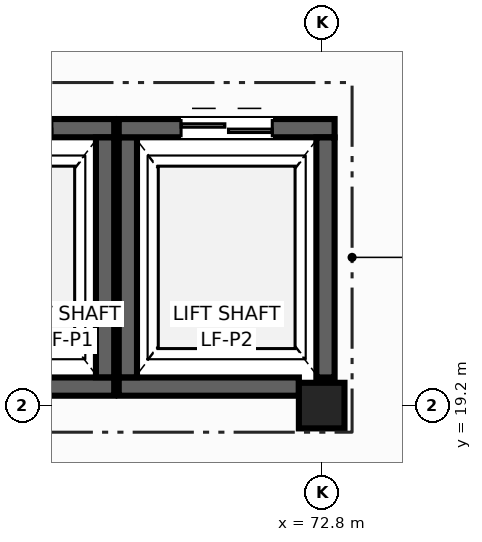
"""IFC4 building model, lengths in metres.
Left out: names, types, materials, properties, quantities, classifications, styles, units other than length and angle.
Written with IfcOpenShell. Run it as: python <this file> out.ifc"""

import sys

from ifc_helpers import new_model, si_unit, direction, frame, frame_2d, origin, origin_2d, place, context, subcontext, project, spatial, rectangle, extrude, element, fill, save


model = new_model("IFC4")
c1 = context("Model", 3, precision=1e-05, world=origin(), true_north=direction((0.0, 1.0)))
c2 = subcontext(c1, "Body", "Model", "MODEL_VIEW")
j1 = project(units=[si_unit("LENGTHUNIT", "METRE"), si_unit("PLANEANGLEUNIT", "RADIAN")], contexts=[c1])
p1 = place(None, origin())
s1 = spatial("IfcSite", under=j1, at=p1, CompositionType="ELEMENT")
p2 = place(p1, origin())
s2 = spatial("IfcBuilding", under=s1, at=p2, CompositionType="ELEMENT")
p3 = place(p2, frame((0.0, 0.0, 14.4)))
s3 = spatial("IfcBuildingStorey", under=s2, at=p3, CompositionType="ELEMENT", Elevation=14.4)
p4 = place(p3, frame((72.8, 19.2, 0.0), z_axis=(0.0, 0.0, 1.0), x_axis=(1.0, 0.0, 0.0)))
e1 = element("IfcColumn", 1, at=p4, inside=s3, PredefinedType="COLUMN", context=c2, shape_type="SweptSolid", body=[
    extrude(rectangle(XDim=0.6, YDim=0.6, at=origin_2d()), origin(), (0.0, 0.0, 1.0), 4.28),
])
p5 = place(p3, frame((70.07, 19.45, 0.0), z_axis=(0.0, 0.0, 1.0), x_axis=(-1.0, 0.0, 0.0)))
e2 = element("IfcWall", 2, at=p5, inside=s3, PredefinedType="SHEAR", context=c2, shape_type="SweptSolid", body=[
    extrude(rectangle(XDim=2.84, YDim=0.24, at=frame_2d((1.42, 0.0))), origin(), (0.0, 0.0, 1.0), 4.28),
])
p6 = place(p3, frame((67.23, 22.85, 0.0), z_axis=(0.0, 0.0, 1.0), x_axis=(1.0, 0.0, 0.0)))
e3 = element("IfcWall", 3, at=p6, inside=s3, PredefinedType="SHEAR", context=c2, shape_type="SweptSolid", body=[
    extrude(rectangle(XDim=2.84, YDim=0.24, at=frame_2d((1.42, 0.0))), origin(), (0.0, 0.0, 1.0), 4.28),
])
p7 = place(p6, frame((0.82, 0.0, 0.0)))
e4 = element("IfcOpeningElement", 4, at=p7, cuts=e3, PredefinedType="OPENING", context=c2, shape_type="SweptSolid", body=[
    extrude(rectangle(XDim=1.2, YDim=2.15, at=frame_2d((0.6, 1.075))), frame((0.0, 0.13, 0.0), z_axis=(0.0, -1.0, 0.0), x_axis=(1.0, 0.0, 0.0)), (0.0, 0.0, 1.0), 0.26),
])
p8 = place(p3, frame((69.95, 22.728, 0.0), z_axis=(0.0, 0.0, 1.0), x_axis=(0.0, -1.0, 0.0)))
e5 = element("IfcWall", 5, at=p8, inside=s3, PredefinedType="SHEAR", context=c2, shape_type="SweptSolid", body=[
    extrude(rectangle(XDim=3.156, YDim=0.24, at=frame_2d((1.578, 0.0))), origin(), (0.0, 0.0, 1.0), 4.28),
])
p9 = place(p3, frame((72.5, 19.45, 0.0), z_axis=(0.0, 0.0, 1.0), x_axis=(-1.0, 0.0, 0.0)))
e6 = element("IfcWall", 6, at=p9, inside=s3, PredefinedType="SHEAR", context=c2, shape_type="SweptSolid", body=[
    extrude(rectangle(XDim=2.37, YDim=0.24, at=frame_2d((1.185, 0.0))), origin(), (0.0, 0.0, 1.0), 4.28),
])
p10 = place(p3, frame((70.25, 19.572, 0.0), z_axis=(0.0, 0.0, 1.0), x_axis=(0.0, 1.0, 0.0)))
e7 = element("IfcWall", 7, at=p10, inside=s3, PredefinedType="SHEAR", context=c2, shape_type="SweptSolid", body=[
    extrude(rectangle(XDim=3.158, YDim=0.24, at=frame_2d((1.579, 0.0))), origin(), (0.0, 0.0, 1.0), 4.28),
])
p11 = place(p3, frame((70.13, 22.85, 0.0), z_axis=(0.0, 0.0, 1.0), x_axis=(1.0, 0.0, 0.0)))
e8 = element("IfcWall", 8, at=p11, inside=s3, PredefinedType="SHEAR", context=c2, shape_type="SweptSolid", body=[
    extrude(rectangle(XDim=2.84, YDim=0.24, at=frame_2d((1.42, 0.0))), origin(), (0.0, 0.0, 1.0), 4.28),
])
p12 = place(p11, frame((0.82, 0.0, 0.0)))
e9 = element("IfcOpeningElement", 9, at=p12, cuts=e8, PredefinedType="OPENING", context=c2, shape_type="SweptSolid", body=[
    extrude(rectangle(XDim=1.2, YDim=2.15, at=frame_2d((0.6, 1.075))), frame((0.0, 0.13, 0.0), z_axis=(0.0, -1.0, 0.0), x_axis=(1.0, 0.0, 0.0)), (0.0, 0.0, 1.0), 0.26),
])
p13 = place(p3, frame((72.85, 22.728, 0.0), z_axis=(0.0, 0.0, 1.0), x_axis=(0.0, -1.0, 0.0)))
e10 = element("IfcWall", 10, at=p13, inside=s3, PredefinedType="SHEAR", context=c2, shape_type="SweptSolid", body=[
    extrude(rectangle(XDim=3.158, YDim=0.24, at=frame_2d((1.579, 0.0))), origin(), (0.0, 0.0, 1.0), 4.28),
])
p14 = place(p7, origin())
e11 = element("IfcDoor", 11, at=p14, inside=s3, OperationType="DOUBLE_DOOR_SLIDING", PredefinedType="DOOR", context=c2, shape_type="SweptSolid", body=[
    extrude(rectangle(XDim=1.2, YDim=2.15, at=frame_2d((0.6, 1.075))), frame((0.0, 0.025, 0.0), z_axis=(0.0, -1.0, 0.0), x_axis=(1.0, 0.0, 0.0)), (0.0, 0.0, 1.0), 0.05),
])
fill(e4, e11)
p15 = place(p12, origin())
e12 = element("IfcDoor", 12, at=p15, inside=s3, OperationType="DOUBLE_DOOR_SLIDING", PredefinedType="DOOR", context=c2, shape_type="SweptSolid", body=[
    extrude(rectangle(XDim=1.2, YDim=2.15, at=frame_2d((0.6, 1.075))), frame((0.0, 0.025, 0.0), z_axis=(0.0, -1.0, 0.0), x_axis=(1.0, 0.0, 0.0)), (0.0, 0.0, 1.0), 0.05),
])
fill(e9, e12)
save(model, sys.argv[1])
